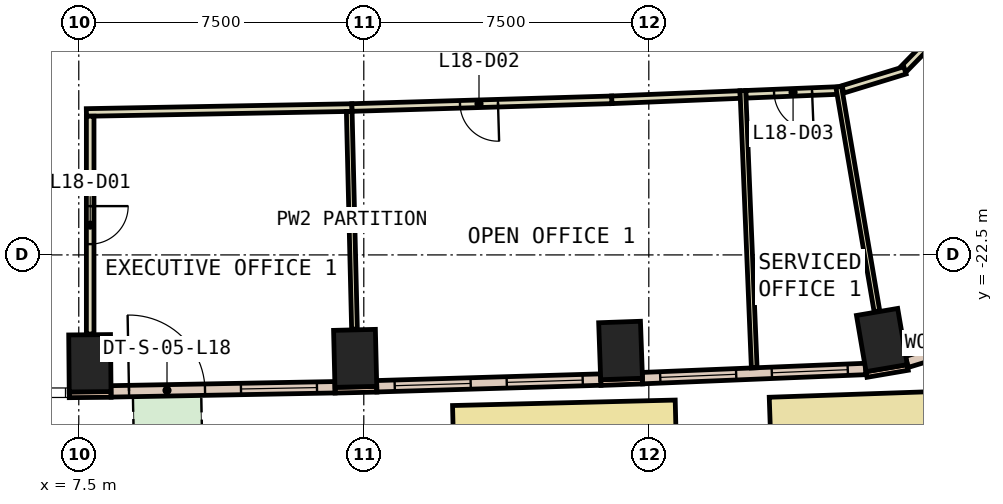
"""IFC4 building model, lengths in metres.
Left out: names, types, materials, properties, quantities, classifications, styles, units other than length and angle.
Written with IfcOpenShell. Run it as: python <this file> out.ifc"""

import sys

from ifc_helpers import new_model, si_unit, direction, frame, frame_2d, origin, origin_2d, place, context, subcontext, project, spatial, rectangle, extrude, element, fill, save


model = new_model("IFC4")
c1 = context("Model", 3, precision=1e-05, world=origin(), true_north=direction((0.0, 1.0)))
c2 = subcontext(c1, "Body", "Model", "MODEL_VIEW")
j1 = project(units=[si_unit("LENGTHUNIT", "METRE"), si_unit("PLANEANGLEUNIT", "RADIAN")], contexts=[c1])
p1 = place(None, origin())
s1 = spatial("IfcSite", under=j1, at=p1, CompositionType="ELEMENT")
p2 = place(p1, origin())
s2 = spatial("IfcBuilding", under=s1, at=p2, CompositionType="ELEMENT")
p3 = place(p2, frame((0.0, 0.0, 86.6)))
s3 = spatial("IfcBuildingStorey", under=s2, at=p3, CompositionType="ELEMENT", Elevation=86.6)
for number, where, z_axis, x_axis in (
    (1, (7.792, -25.351, 0.0), (0.0, 0.0, 1.0), (1.0, 0.009, 0.0)),
    (2, (14.773, -25.222, 0.0), (0.0, 0.0, 1.0), (1.0, 0.024, 0.0)),
    (3, (21.757, -25.015, 0.0), (0.0, 0.0, 1.0), (0.999, 0.035, 0.0)),
    (4, (28.633, -24.74, 0.0), (0.0, 0.0, 1.0), (0.986, 0.168, 0.0)),
):
    element("IfcColumn", number, at=place(p3, frame(where, z_axis=z_axis, x_axis=x_axis)), inside=s3, PredefinedType="COLUMN", context=c2, shape_type="SweptSolid", body=[
        extrude(rectangle(XDim=1.1, YDim=1.5, at=origin_2d()), origin(), (0.0, 0.0, 1.0), 3.8),
    ])
p4 = place(p3, frame((7.249, -26.181, 0.0), z_axis=(0.0, 0.0, 1.0), x_axis=(0.99995860686, 0.009098602504, 0.0)))
e5 = element("IfcWall", 5, at=p4, inside=s3, PredefinedType="STANDARD", context=c2, shape_type="SweptSolid", body=[
    extrude(rectangle(XDim=1.1, YDim=0.15, at=frame_2d((0.55, 0.0))), origin(), (0.0, 0.0, 1.0), 3.8),
])
p5 = place(p3, frame((14.243, -26.06, 0.0), z_axis=(0.0, 0.0, 1.0), x_axis=(0.999718180159, 0.023739424163, 0.0)))
e6 = element("IfcWall", 6, at=p5, inside=s3, PredefinedType="STANDARD", context=c2, shape_type="SweptSolid", body=[
    extrude(rectangle(XDim=1.1, YDim=0.15, at=frame_2d((0.55, 0.0))), origin(), (0.0, 0.0, 1.0), 3.8),
])
p6 = place(p3, frame((21.237, -25.859, 0.0), z_axis=(0.0, 0.0, 1.0), x_axis=(0.999376638472, 0.035303462679, 0.0)))
e7 = element("IfcWall", 7, at=p6, inside=s3, PredefinedType="STANDARD", context=c2, shape_type="SweptSolid", body=[
    extrude(rectangle(XDim=1.1, YDim=0.15, at=frame_2d((0.55, 0.0))), origin(), (0.0, 0.0, 1.0), 3.8),
])
p7 = place(p3, frame((28.229, -25.646, 0.0), z_axis=(0.0, 0.0, 1.0), x_axis=(0.985763338892, 0.168138751323, 0.0)))
e8 = element("IfcWall", 8, at=p7, inside=s3, PredefinedType="STANDARD", context=c2, shape_type="SweptSolid", body=[
    extrude(rectangle(XDim=1.101, YDim=0.15, at=frame_2d((0.55, 0.0))), origin(), (0.0, 0.0, 1.0), 3.8),
])
p8 = place(p3, frame((8.348, -26.091, 0.0), z_axis=(0.0, 0.0, 1.0), x_axis=(0.999828633111, 0.018512277318, 0.0)))
e9 = element("IfcWall", 9, at=p8, inside=s3, PredefinedType="STANDARD", context=c2, shape_type="SweptSolid", body=[
    extrude(rectangle(XDim=5.895, YDim=0.3, at=frame_2d((2.948, 0.0))), origin(), (0.0, 0.0, 1.0), 3.8),
])
p9 = place(p8, frame((0.474, 0.0, 0.0)))
e10 = element("IfcOpeningElement", 10, at=p9, cuts=e9, PredefinedType="OPENING", context=c2, shape_type="SweptSolid", body=[
    extrude(rectangle(XDim=2.0, YDim=2.4, at=frame_2d((1.0, 1.2))), frame((0.0, 0.16, 0.0), z_axis=(0.0, -1.0, 0.0), x_axis=(1.0, 0.0, 0.0)), (0.0, 0.0, 1.0), 0.32),
])
p10 = place(p8, frame((3.421, 0.0, 0.9)))
e11 = element("IfcOpeningElement", 11, at=p10, cuts=e9, PredefinedType="OPENING", context=c2, shape_type="SweptSolid", body=[
    extrude(rectangle(XDim=2.0, YDim=2.6, at=frame_2d((1.0, 1.3))), frame((0.0, 0.16, 0.0), z_axis=(0.0, -1.0, 0.0), x_axis=(1.0, 0.0, 0.0)), (0.0, 0.0, 1.0), 0.32),
])
p11 = place(p3, frame((15.34, -25.956, 0.0), z_axis=(0.0, 0.0, 1.0), x_axis=(0.999554487555, 0.029846715213, 0.0)))
e12 = element("IfcWall", 12, at=p11, inside=s3, PredefinedType="STANDARD", context=c2, shape_type="SweptSolid", body=[
    extrude(rectangle(XDim=5.898, YDim=0.3, at=frame_2d((2.949, 0.0))), origin(), (0.0, 0.0, 1.0), 3.8),
])
p12 = place(p11, frame((0.474, 0.0, 0.9)))
e13 = element("IfcOpeningElement", 13, at=p12, cuts=e12, PredefinedType="OPENING", context=c2, shape_type="SweptSolid", body=[
    extrude(rectangle(XDim=2.0, YDim=2.6, at=frame_2d((1.0, 1.3))), frame((0.0, 0.16, 0.0), z_axis=(0.0, -1.0, 0.0), x_axis=(1.0, 0.0, 0.0)), (0.0, 0.0, 1.0), 0.32),
])
p13 = place(p11, frame((3.423, 0.0, 0.9)))
e14 = element("IfcOpeningElement", 14, at=p13, cuts=e12, PredefinedType="OPENING", context=c2, shape_type="SweptSolid", body=[
    extrude(rectangle(XDim=2.0, YDim=2.6, at=frame_2d((1.0, 1.3))), frame((0.0, 0.16, 0.0), z_axis=(0.0, -1.0, 0.0), x_axis=(1.0, 0.0, 0.0)), (0.0, 0.0, 1.0), 0.32),
])
p14 = place(p3, frame((22.332, -25.742, 0.0), z_axis=(0.0, 0.0, 1.0), x_axis=(0.999159360905, 0.040994774244, 0.0)))
e15 = element("IfcWall", 15, at=p14, inside=s3, PredefinedType="STANDARD", context=c2, shape_type="SweptSolid", body=[
    extrude(rectangle(XDim=5.878, YDim=0.3, at=frame_2d((2.939, 0.0))), origin(), (0.0, 0.0, 1.0), 3.8),
])
p15 = place(p14, frame((0.469, 0.0, 0.9)))
e16 = element("IfcOpeningElement", 16, at=p15, cuts=e15, PredefinedType="OPENING", context=c2, shape_type="SweptSolid", body=[
    extrude(rectangle(XDim=2.0, YDim=2.6, at=frame_2d((1.0, 1.3))), frame((0.0, 0.16, 0.0), z_axis=(0.0, -1.0, 0.0), x_axis=(1.0, 0.0, 0.0)), (0.0, 0.0, 1.0), 0.32),
])
p16 = place(p14, frame((3.408, 0.0, 0.9)))
e17 = element("IfcOpeningElement", 17, at=p16, cuts=e15, PredefinedType="OPENING", context=c2, shape_type="SweptSolid", body=[
    extrude(rectangle(XDim=2.0, YDim=2.6, at=frame_2d((1.0, 1.3))), frame((0.0, 0.16, 0.0), z_axis=(0.0, -1.0, 0.0), x_axis=(1.0, 0.0, 0.0)), (0.0, 0.0, 1.0), 0.32),
])
p17 = place(p3, frame((29.288, -25.316, 0.0), z_axis=(0.0, 0.0, 1.0), x_axis=(0.956317661006, 0.292329490895, 0.0)))
e18 = element("IfcWall", 18, at=p17, inside=s3, PredefinedType="STANDARD", context=c2, shape_type="SweptSolid", body=[
    extrude(rectangle(XDim=3.41, YDim=0.3, at=frame_2d((1.705, 0.0))), origin(), (0.0, 0.0, 1.0), 3.8),
])
p18 = place(p17, frame((1.005, 0.0, 0.9)))
e19 = element("IfcOpeningElement", 19, at=p18, cuts=e18, PredefinedType="OPENING", context=c2, shape_type="SweptSolid", body=[
    extrude(rectangle(XDim=1.4, YDim=2.6, at=frame_2d((0.7, 1.3))), frame((0.0, 0.16, 0.0), z_axis=(0.0, -1.0, 0.0), x_axis=(1.0, 0.0, 0.0)), (0.0, 0.0, 1.0), 0.32),
])
p19 = place(p3, frame((17.359, -27.413, 0.0), z_axis=(0.0, 0.0, 1.0), x_axis=(0.999697941593, 0.02457693177, 0.0)))
e20 = element("IfcWall", 20, at=p19, inside=s3, PredefinedType="STANDARD", context=c2, shape_type="SweptSolid", body=[
    extrude(rectangle(XDim=5.861, YDim=1.9, at=frame_2d((2.93, 0.0))), origin(), (0.0, 0.0, 1.0), 0.8),
])
p20 = place(p3, frame((25.702, -27.195, 0.0), z_axis=(0.0, 0.0, 1.0), x_axis=(0.999399802094, 0.034641529615, 0.0)))
e21 = element("IfcWall", 21, at=p20, inside=s3, PredefinedType="STANDARD", context=c2, shape_type="SweptSolid", body=[
    extrude(rectangle(XDim=5.864, YDim=1.9, at=frame_2d((2.932, 0.0))), origin(), (0.0, 0.0, 1.0), 0.8),
])
p21 = place(p3, frame((14.689, -18.623, 0.0), z_axis=(0.0, 0.0, 1.0), x_axis=(-0.99982995049, -0.01844098976, 0.0)))
e22 = element("IfcWall", 22, at=p21, inside=s3, PredefinedType="PARTITIONING", context=c2, shape_type="SweptSolid", body=[
    extrude(rectangle(XDim=6.99, YDim=0.2, at=frame_2d((3.495, 0.0))), origin(), (0.0, 0.0, 1.0), 3.8),
])
p22 = place(p3, frame((24.904, -18.28, 0.0), z_axis=(0.0, 0.0, 1.0), x_axis=(-0.999156550882, -0.041063205305, 0.0)))
e23 = element("IfcWall", 23, at=p22, inside=s3, PredefinedType="PARTITIONING", context=c2, shape_type="SweptSolid", body=[
    extrude(rectangle(XDim=3.383, YDim=0.2, at=frame_2d((1.691, 0.0))), origin(), (0.0, 0.0, 1.0), 3.8),
])
p23 = place(p3, frame((21.524, -18.419, 0.0), z_axis=(0.0, 0.0, 1.0), x_axis=(-0.999558696746, -0.029705416334, 0.0)))
e24 = element("IfcWall", 24, at=p23, inside=s3, PredefinedType="PARTITIONING", context=c2, shape_type="SweptSolid", body=[
    extrude(rectangle(XDim=6.838, YDim=0.2, at=frame_2d((3.419, 0.0))), origin(), (0.0, 0.0, 1.0), 3.8),
])
p24 = place(p23, frame((2.994, 0.0, 0.0)))
e25 = element("IfcOpeningElement", 25, at=p24, cuts=e24, PredefinedType="OPENING", context=c2, shape_type="SweptSolid", body=[
    extrude(rectangle(XDim=1.0, YDim=2.1, at=frame_2d((0.5, 1.05))), frame((0.0, 0.11, 0.0), z_axis=(0.0, -1.0, 0.0), x_axis=(1.0, 0.0, 0.0)), (0.0, 0.0, 1.0), 0.22),
])
p25 = place(p3, frame((27.538, -18.172, 0.0), z_axis=(0.0, 0.0, 1.0), x_axis=(-0.999161261417, -0.040948427126, 0.0)))
e26 = element("IfcWall", 26, at=p25, inside=s3, PredefinedType="PARTITIONING", context=c2, shape_type="SweptSolid", body=[
    extrude(rectangle(XDim=2.486, YDim=0.2, at=frame_2d((1.243, 0.0))), origin(), (0.0, 0.0, 1.0), 3.8),
])
p26 = place(p25, frame((0.743, 0.0, 0.0)))
e27 = element("IfcOpeningElement", 27, at=p26, cuts=e26, PredefinedType="OPENING", context=c2, shape_type="SweptSolid", body=[
    extrude(rectangle(XDim=1.0, YDim=2.1, at=frame_2d((0.5, 1.05))), frame((0.0, 0.11, 0.0), z_axis=(0.0, -1.0, 0.0), x_axis=(1.0, 0.0, 0.0)), (0.0, 0.0, 1.0), 0.22),
])
p27 = place(p3, frame((29.743, -17.061, 0.0), z_axis=(0.0, 0.0, 1.0), x_axis=(-0.698331924638, -0.715774072617, 0.0)))
e28 = element("IfcWall", 28, at=p27, inside=s3, PredefinedType="PARTITIONING", context=c2, shape_type="SweptSolid", body=[
    extrude(rectangle(XDim=0.756, YDim=0.2, at=frame_2d((0.378, 0.0))), origin(), (0.0, 0.0, 1.0), 3.8),
])
p28 = place(p3, frame((29.24, -17.644, 0.0), z_axis=(0.0, 0.0, 1.0), x_axis=(-0.956137025409, -0.292919764852, 0.0)))
e29 = element("IfcWall", 29, at=p28, inside=s3, PredefinedType="PARTITIONING", context=c2, shape_type="SweptSolid", body=[
    extrude(rectangle(XDim=1.707, YDim=0.2, at=frame_2d((0.854, 0.0))), origin(), (0.0, 0.0, 1.0), 3.8),
])
p29 = place(p3, frame((7.8, -18.85, 0.0), z_axis=(0.0, 0.0, 1.0), x_axis=(0.0, -1.0, 0.0)))
e30 = element("IfcWall", 30, at=p29, inside=s3, PredefinedType="PARTITIONING", context=c2, shape_type="SweptSolid", body=[
    extrude(rectangle(XDim=5.731, YDim=0.2, at=frame_2d((2.865, 0.0))), origin(), (0.0, 0.0, 1.0), 3.8),
])
p30 = place(p29, frame((2.366, 0.0, 0.0)))
e31 = element("IfcOpeningElement", 31, at=p30, cuts=e30, PredefinedType="OPENING", context=c2, shape_type="SweptSolid", body=[
    extrude(rectangle(XDim=1.0, YDim=2.1, at=frame_2d((0.5, 1.05))), frame((0.0, 0.11, 0.0), z_axis=(0.0, -1.0, 0.0), x_axis=(1.0, 0.0, 0.0)), (0.0, 0.0, 1.0), 0.22),
])
p31 = place(p3, frame((14.617, -18.724, 0.0), z_axis=(0.0, 0.0, 1.0), x_axis=(0.02407553942, -0.999710142192, 0.0)))
e32 = element("IfcWall", 32, at=p31, inside=s3, PredefinedType="PARTITIONING", context=c2, shape_type="SweptSolid", body=[
    extrude(rectangle(XDim=5.729, YDim=0.15, at=frame_2d((2.865, 0.0))), origin(), (0.0, 0.0, 1.0), 3.8),
])
p32 = place(p3, frame((24.975, -18.177, 0.0), z_axis=(0.0, 0.0, 1.0), x_axis=(0.040934999913, -0.999161811611, 0.0)))
e33 = element("IfcWall", 33, at=p32, inside=s3, PredefinedType="PARTITIONING", context=c2, shape_type="SweptSolid", body=[
    extrude(rectangle(XDim=7.3, YDim=0.15, at=frame_2d((3.65, 0.0))), origin(), (0.0, 0.0, 1.0), 3.8),
])
p33 = place(p3, frame((27.496, -18.074, 0.0), z_axis=(0.0, 0.0, 1.0), x_axis=(0.168025125373, -0.985782712997, 0.0)))
e34 = element("IfcWall", 34, at=p33, inside=s3, PredefinedType="PARTITIONING", context=c2, shape_type="SweptSolid", body=[
    extrude(rectangle(XDim=5.992, YDim=0.15, at=frame_2d((2.996, 0.0))), origin(), (0.0, 0.0, 1.0), 3.8),
])
p34 = place(p9, origin())
e35 = element("IfcDoor", 35, at=p34, inside=s3, OperationType="SLIDING_TO_LEFT", PredefinedType="DOOR", context=c2, shape_type="SweptSolid", body=[
    extrude(rectangle(XDim=2.0, YDim=2.4, at=frame_2d((1.0, 1.2))), frame((0.0, 0.025, 0.0), z_axis=(0.0, -1.0, 0.0), x_axis=(1.0, 0.0, 0.0)), (0.0, 0.0, 1.0), 0.05),
])
fill(e10, e35)
p35 = place(p10, origin())
e36 = element("IfcWindow", 36, at=p35, inside=s3, PartitioningType="SINGLE_PANEL", PredefinedType="WINDOW", context=c2, shape_type="SweptSolid", body=[
    extrude(rectangle(XDim=2.0, YDim=2.6, at=frame_2d((1.0, 1.3))), frame((0.0, 0.03, 0.0), z_axis=(0.0, -1.0, 0.0), x_axis=(1.0, 0.0, 0.0)), (0.0, 0.0, 1.0), 0.06),
])
fill(e11, e36)
p36 = place(p12, origin())
e37 = element("IfcWindow", 37, at=p36, inside=s3, PartitioningType="SINGLE_PANEL", PredefinedType="WINDOW", context=c2, shape_type="SweptSolid", body=[
    extrude(rectangle(XDim=2.0, YDim=2.6, at=frame_2d((1.0, 1.3))), frame((0.0, 0.03, 0.0), z_axis=(0.0, -1.0, 0.0), x_axis=(1.0, 0.0, 0.0)), (0.0, 0.0, 1.0), 0.06),
])
fill(e13, e37)
p37 = place(p13, origin())
e38 = element("IfcWindow", 38, at=p37, inside=s3, PartitioningType="SINGLE_PANEL", PredefinedType="WINDOW", context=c2, shape_type="SweptSolid", body=[
    extrude(rectangle(XDim=2.0, YDim=2.6, at=frame_2d((1.0, 1.3))), frame((0.0, 0.03, 0.0), z_axis=(0.0, -1.0, 0.0), x_axis=(1.0, 0.0, 0.0)), (0.0, 0.0, 1.0), 0.06),
])
fill(e14, e38)
p38 = place(p15, origin())
e39 = element("IfcWindow", 39, at=p38, inside=s3, PartitioningType="SINGLE_PANEL", PredefinedType="WINDOW", context=c2, shape_type="SweptSolid", body=[
    extrude(rectangle(XDim=2.0, YDim=2.6, at=frame_2d((1.0, 1.3))), frame((0.0, 0.03, 0.0), z_axis=(0.0, -1.0, 0.0), x_axis=(1.0, 0.0, 0.0)), (0.0, 0.0, 1.0), 0.06),
])
fill(e16, e39)
p39 = place(p16, origin())
e40 = element("IfcWindow", 40, at=p39, inside=s3, PartitioningType="SINGLE_PANEL", PredefinedType="WINDOW", context=c2, shape_type="SweptSolid", body=[
    extrude(rectangle(XDim=2.0, YDim=2.6, at=frame_2d((1.0, 1.3))), frame((0.0, 0.03, 0.0), z_axis=(0.0, -1.0, 0.0), x_axis=(1.0, 0.0, 0.0)), (0.0, 0.0, 1.0), 0.06),
])
fill(e17, e40)
p40 = place(p30, origin())
e41 = element("IfcDoor", 41, at=p40, inside=s3, OperationType="SINGLE_SWING_LEFT", PredefinedType="DOOR", context=c2, shape_type="SweptSolid", body=[
    extrude(rectangle(XDim=1.0, YDim=2.1, at=frame_2d((0.5, 1.05))), frame((0.0, 0.025, 0.0), z_axis=(0.0, -1.0, 0.0), x_axis=(1.0, 0.0, 0.0)), (0.0, 0.0, 1.0), 0.05),
])
fill(e31, e41)
p41 = place(p24, origin())
e42 = element("IfcDoor", 42, at=p41, inside=s3, OperationType="SINGLE_SWING_LEFT", PredefinedType="DOOR", context=c2, shape_type="SweptSolid", body=[
    extrude(rectangle(XDim=1.0, YDim=2.1, at=frame_2d((0.5, 1.05))), frame((0.0, 0.025, 0.0), z_axis=(0.0, -1.0, 0.0), x_axis=(1.0, 0.0, 0.0)), (0.0, 0.0, 1.0), 0.05),
])
fill(e25, e42)
p42 = place(p26, origin())
e43 = element("IfcDoor", 43, at=p42, inside=s3, OperationType="SINGLE_SWING_LEFT", PredefinedType="DOOR", context=c2, shape_type="SweptSolid", body=[
    extrude(rectangle(XDim=1.0, YDim=2.1, at=frame_2d((0.5, 1.05))), frame((0.0, 0.025, 0.0), z_axis=(0.0, -1.0, 0.0), x_axis=(1.0, 0.0, 0.0)), (0.0, 0.0, 1.0), 0.05),
])
fill(e27, e43)
save(model, sys.argv[1])
